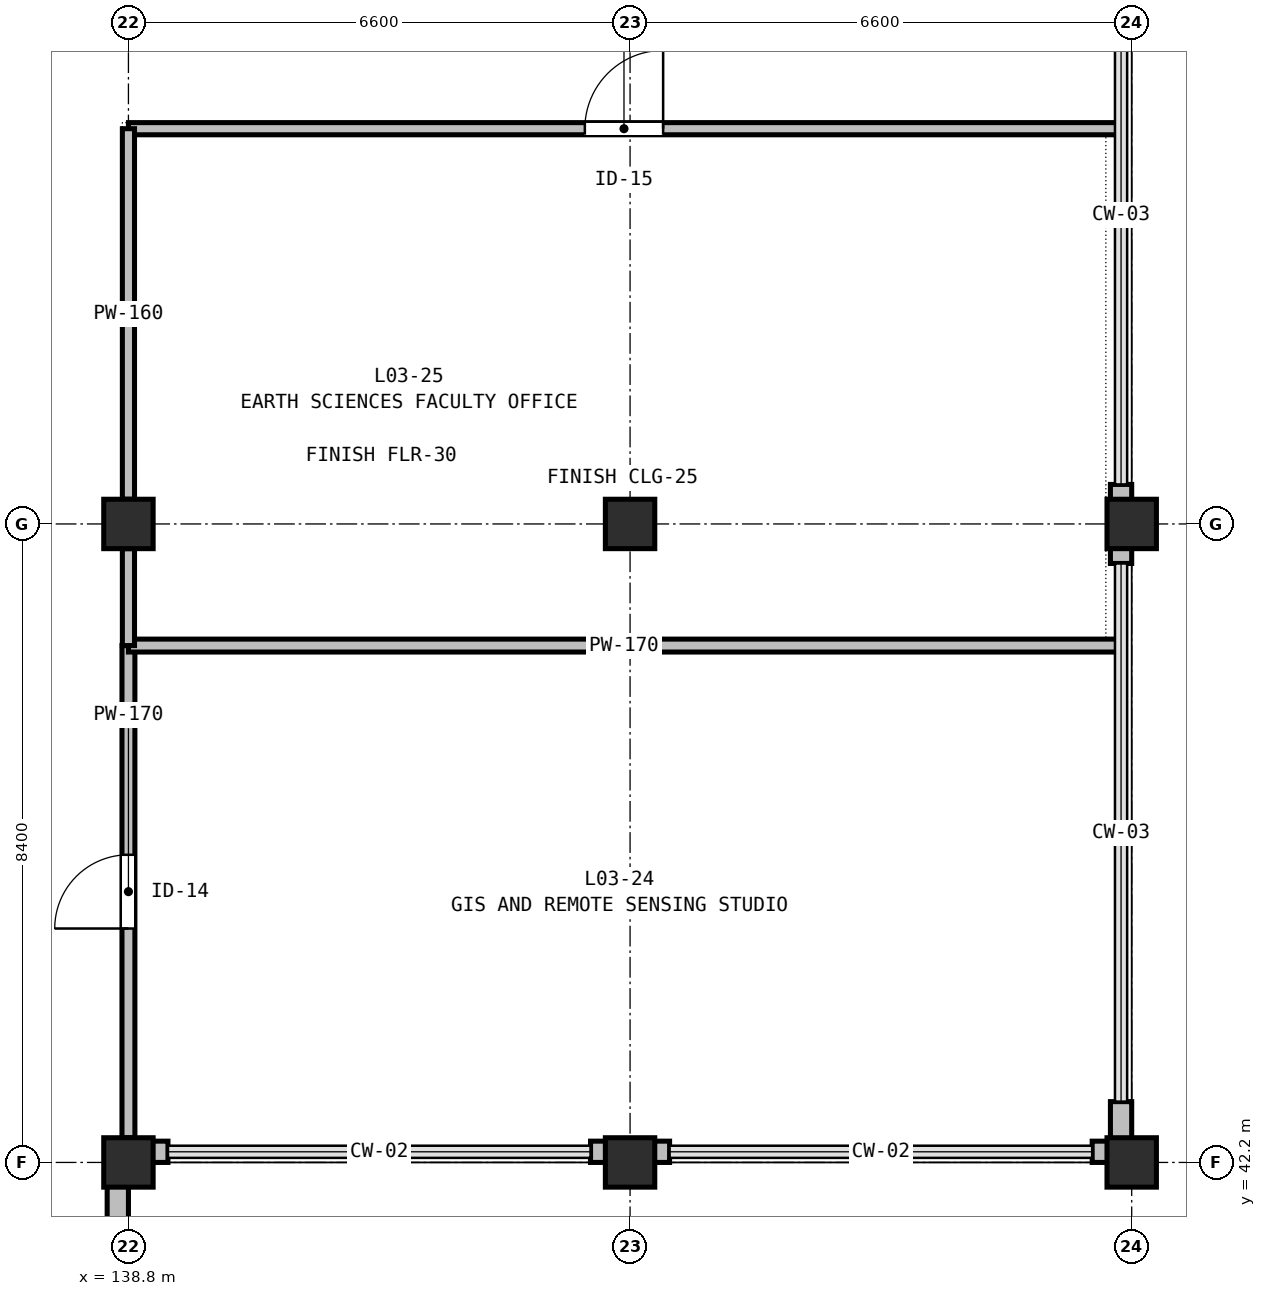
"""IFC4 building model, lengths in metres.
Left out: names, types, materials, properties, quantities, classifications, styles, units other than length and angle.
Written with IfcOpenShell. Run it as: python <this file> out.ifc"""

import sys

from ifc_helpers import new_model, si_unit, direction, frame, frame_2d, origin, origin_2d, place, context, subcontext, project, spatial, rectangle, extrude, element, fill, save


model = new_model("IFC4")
c1 = context("Model", 3, precision=1e-05, world=origin(), true_north=direction((0.0, 1.0)))
c2 = subcontext(c1, "Body", "Model", "MODEL_VIEW")
j1 = project(units=[si_unit("LENGTHUNIT", "METRE"), si_unit("PLANEANGLEUNIT", "RADIAN")], contexts=[c1])
p1 = place(None, origin())
s1 = spatial("IfcSite", under=j1, at=p1, CompositionType="ELEMENT")
p2 = place(p1, origin())
s2 = spatial("IfcBuilding", under=s1, at=p2, CompositionType="ELEMENT")
p3 = place(p2, frame((0.0, 0.0, 15.0)))
s3 = spatial("IfcBuildingStorey", under=s2, at=p3, CompositionType="ELEMENT", Elevation=15.0)
for number, where, z_axis, x_axis in (
    (1, (138.8, 42.2, 0.0), (0.0, 0.0, 1.0), (1.0, 0.0, 0.0)),
    (2, (138.8, 50.6, 0.0), (0.0, 0.0, 1.0), (1.0, 0.0, 0.0)),
    (3, (145.4, 42.2, 0.0), (0.0, 0.0, 1.0), (1.0, 0.0, 0.0)),
    (4, (145.4, 50.6, 0.0), (0.0, 0.0, 1.0), (1.0, 0.0, 0.0)),
    (5, (152.0, 42.2, 0.0), (0.0, 0.0, 1.0), (1.0, 0.0, 0.0)),
    (6, (152.0, 50.6, 0.0), (0.0, 0.0, 1.0), (1.0, 0.0, 0.0)),
):
    element("IfcColumn", number, at=place(p3, frame(where, z_axis=z_axis, x_axis=x_axis)), inside=s3, PredefinedType="COLUMN", context=c2, shape_type="SweptSolid", body=[
        extrude(rectangle(XDim=0.65, YDim=0.65, at=origin_2d()), origin(), (0.0, 0.0, 1.0), 4.5),
    ])
for number, where, z_axis, x_axis in (
    (7, (151.86, 51.12, 0.0), (0.0, 0.0, 1.0), (0.0, -1.0, 0.0)),
    (8, (151.86, 50.6, 0.0), (0.0, 0.0, 1.0), (0.0, -1.0, 0.0)),
    (9, (151.86, 43.0, 0.0), (0.0, 0.0, 1.0), (0.0, -1.0, 0.0)),
):
    element("IfcWall", number, at=place(p3, frame(where, z_axis=z_axis, x_axis=x_axis)), inside=s3, PredefinedType="STANDARD", context=c2, shape_type="SweptSolid", body=[
        extrude(rectangle(XDim=0.52, YDim=0.28, at=frame_2d((0.26, 0.0))), origin(), (0.0, 0.0, 1.0), 3.785),
    ])
for number, where, z_axis, x_axis in (
    (10, (152.0, 42.34, 0.0), (0.0, 0.0, 1.0), (-1.0, 0.0, 0.0)),
    (11, (145.92, 42.34, 0.0), (0.0, 0.0, 1.0), (-1.0, 0.0, 0.0)),
    (12, (145.4, 42.34, 0.0), (0.0, 0.0, 1.0), (-1.0, 0.0, 0.0)),
    (13, (139.32, 42.34, 0.0), (0.0, 0.0, 1.0), (-1.0, 0.0, 0.0)),
):
    element("IfcWall", number, at=place(p3, frame(where, z_axis=z_axis, x_axis=x_axis)), inside=s3, PredefinedType="STANDARD", context=c2, shape_type="SweptSolid", body=[
        extrude(rectangle(XDim=0.52, YDim=0.28, at=frame_2d((0.26, 0.0))), origin(), (0.0, 0.0, 1.0), 3.735),
    ])
p4 = place(p3, frame((138.66, 41.92, 0.0), z_axis=(0.0, 0.0, 1.0), x_axis=(0.0, -1.0, 0.0)))
e14 = element("IfcWall", 14, at=p4, inside=s3, PredefinedType="STANDARD", context=c2, shape_type="SweptSolid", body=[
    extrude(rectangle(XDim=0.52, YDim=0.28, at=frame_2d((0.26, 0.0))), origin(), (0.0, 0.0, 1.0), 3.785),
])
p5 = place(p3, frame((138.8, 42.525, 0.0), z_axis=(0.0, 0.0, 1.0), x_axis=(0.0, 1.0, 0.0)))
e15 = element("IfcWall", 15, at=p5, inside=s3, PredefinedType="PARTITIONING", context=c2, shape_type="SweptSolid", body=[
    extrude(rectangle(XDim=6.475, YDim=0.17, at=frame_2d((3.238, 0.0))), origin(), (0.0, 0.0, 1.0), 3.735),
])
p6 = place(p5, frame((2.752, 0.0, 0.0)))
e16 = element("IfcOpeningElement", 16, at=p6, cuts=e15, PredefinedType="OPENING", context=c2, shape_type="SweptSolid", body=[
    extrude(rectangle(XDim=0.97, YDim=2.1, at=frame_2d((0.485, 1.05))), frame((0.0, 0.095, 0.0), z_axis=(0.0, -1.0, 0.0), x_axis=(1.0, 0.0, 0.0)), (0.0, 0.0, 1.0), 0.19),
])
p7 = place(p3, frame((138.8, 49.0, 0.0), z_axis=(0.0, 0.0, 1.0), x_axis=(1.0, 0.0, 0.0)))
e17 = element("IfcWall", 17, at=p7, inside=s3, PredefinedType="PARTITIONING", context=c2, shape_type="SweptSolid", body=[
    extrude(rectangle(XDim=13.04, YDim=0.17, at=frame_2d((6.52, 0.0))), origin(), (0.0, 0.0, 1.0), 3.735),
])
p8 = place(p3, frame((138.8, 55.8, 0.0), z_axis=(0.0, 0.0, 1.0), x_axis=(1.0, 0.0, 0.0)))
e18 = element("IfcWall", 18, at=p8, inside=s3, PredefinedType="PARTITIONING", context=c2, shape_type="SweptSolid", body=[
    extrude(rectangle(XDim=13.04, YDim=0.16, at=frame_2d((6.52, 0.0))), origin(), (0.0, 0.0, 1.0), 3.735),
])
p9 = place(p8, frame((6.005, 0.0, 0.0)))
e19 = element("IfcOpeningElement", 19, at=p9, cuts=e18, PredefinedType="OPENING", context=c2, shape_type="SweptSolid", body=[
    extrude(rectangle(XDim=1.03, YDim=2.1, at=frame_2d((0.515, 1.05))), frame((0.0, 0.09, 0.0), z_axis=(0.0, -1.0, 0.0), x_axis=(1.0, 0.0, 0.0)), (0.0, 0.0, 1.0), 0.18),
])
p10 = place(p3, frame((138.8, 49.0, 0.0), z_axis=(0.0, 0.0, 1.0), x_axis=(0.0, 1.0, 0.0)))
e20 = element("IfcWall", 20, at=p10, inside=s3, PredefinedType="PARTITIONING", context=c2, shape_type="SweptSolid", body=[
    extrude(rectangle(XDim=1.275, YDim=0.16, at=frame_2d((0.637, 0.0))), origin(), (0.0, 0.0, 1.0), 3.735),
])
p11 = place(p3, frame((138.8, 50.925, 0.0), z_axis=(0.0, 0.0, 1.0), x_axis=(0.0, 1.0, 0.0)))
e21 = element("IfcWall", 21, at=p11, inside=s3, PredefinedType="PARTITIONING", context=c2, shape_type="SweptSolid", body=[
    extrude(rectangle(XDim=4.875, YDim=0.16, at=frame_2d((2.438, 0.0))), origin(), (0.0, 0.0, 1.0), 3.735),
])
p12 = place(p6, origin())
e22 = element("IfcDoor", 22, at=p12, inside=s3, OperationType="SINGLE_SWING_LEFT", PredefinedType="DOOR", context=c2, shape_type="SweptSolid", body=[
    extrude(rectangle(XDim=0.97, YDim=2.1, at=frame_2d((0.485, 1.05))), frame((0.0, 0.025, 0.0), z_axis=(0.0, -1.0, 0.0), x_axis=(1.0, 0.0, 0.0)), (0.0, 0.0, 1.0), 0.05),
])
fill(e16, e22)
p13 = place(p9, origin())
e23 = element("IfcDoor", 23, at=p13, inside=s3, OperationType="SINGLE_SWING_RIGHT", PredefinedType="DOOR", context=c2, shape_type="SweptSolid", body=[
    extrude(rectangle(XDim=1.03, YDim=2.1, at=frame_2d((0.515, 1.05))), frame((0.0, 0.025, 0.0), z_axis=(0.0, -1.0, 0.0), x_axis=(1.0, 0.0, 0.0)), (0.0, 0.0, 1.0), 0.05),
])
fill(e19, e23)
save(model, sys.argv[1])
